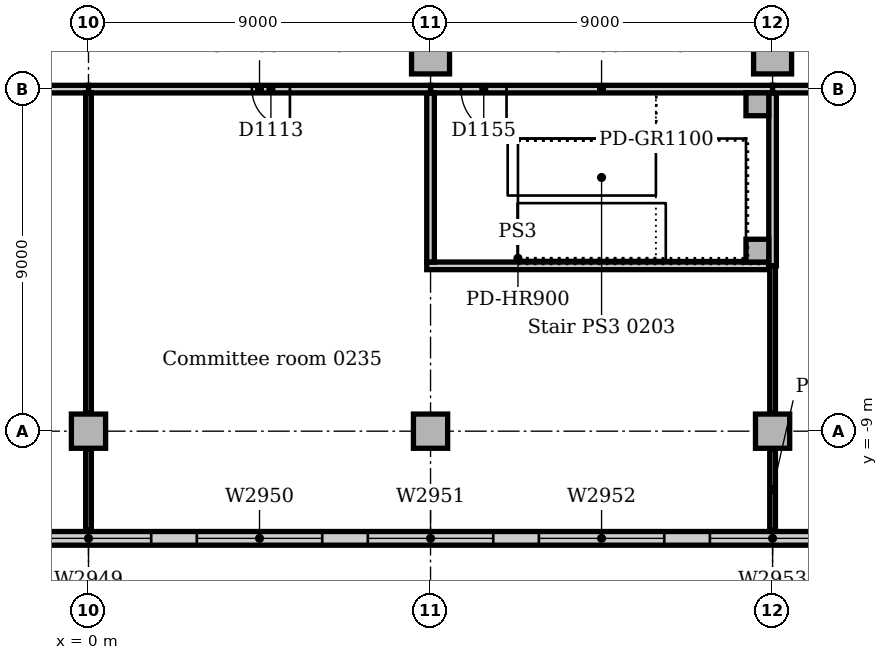
"""IFC4 building model, lengths in metres.
Left out: names, types, materials, properties, quantities, classifications, styles, units other than length and angle.
Written with IfcOpenShell. Run it as: python <this file> out.ifc"""

import sys

from ifc_helpers import new_model, si_unit, direction, frame, frame_2d, origin, origin_with_axes, origin_2d, place, context, subcontext, project, spatial, rectangle, extrude, element, fill, save


model = new_model("IFC4")
c1 = context("Model", 3, precision=1e-05, world=origin(), true_north=direction((0.0, 1.0)))
c2 = subcontext(c1, "Body", "Model", "MODEL_VIEW")
j1 = project(units=[si_unit("LENGTHUNIT", "METRE"), si_unit("PLANEANGLEUNIT", "RADIAN")], contexts=[c1])
p1 = place(None, origin())
s1 = spatial("IfcSite", under=j1, at=p1, CompositionType="ELEMENT")
p2 = place(p1, origin())
s2 = spatial("IfcBuilding", under=s1, at=p2, CompositionType="ELEMENT")
p3 = place(p2, frame((0.0, 0.0, 11.0)))
s3 = spatial("IfcBuildingStorey", under=s2, at=p3, CompositionType="ELEMENT", Elevation=11.0)
p4 = place(p3, frame((3.602, 1.453, 0.0), z_axis=(0.0, 0.0, 1.0), x_axis=(1.0, 0.0, 0.0)))
e1 = element("IfcColumn", 1, at=p4, inside=s3, PredefinedType="COLUMN", context=c2, shape_type="SweptSolid", body=[
    extrude(rectangle(XDim=1.2, YDim=1.2, at=origin_2d()), origin(), (0.0, 0.0, 1.0), 4.7),
])
for number, where, z_axis, x_axis in (
    (2, (9.0, 0.9, 0.0), (0.0, 0.0, 1.0), (1.0, 0.0, 0.0)),
    (3, (18.0, 0.9, 0.0), (0.0, 0.0, 1.0), (1.0, 0.0, 0.0)),
):
    element("IfcColumn", number, at=place(p3, frame(where, z_axis=z_axis, x_axis=x_axis)), inside=s3, PredefinedType="COLUMN", context=c2, shape_type="SweptSolid", body=[
        extrude(rectangle(XDim=1.0, YDim=1.0, at=origin_2d()), origin(), (0.0, 0.0, 1.0), 4.7),
    ])
for number, where, z_axis, x_axis in (
    (4, (0.0, -9.0, 0.0), (0.0, 0.0, 1.0), (1.0, 0.0, 0.0)),
    (5, (9.0, -9.0, 0.0), (0.0, 0.0, 1.0), (1.0, 0.0, 0.0)),
    (6, (18.0, -9.0, 0.0), (0.0, 0.0, 1.0), (1.0, 0.0, 0.0)),
):
    element("IfcColumn", number, at=place(p3, frame(where, z_axis=z_axis, x_axis=x_axis)), inside=s3, PredefinedType="COLUMN", context=c2, shape_type="SweptSolid", body=[
        extrude(rectangle(XDim=0.9, YDim=0.9, at=origin_2d()), origin(), (0.0, 0.0, 1.0), 4.7),
    ])
p5 = place(p3, frame((-81.0, -11.82, 0.0), z_axis=(0.0, 0.0, 1.0), x_axis=(1.0, 0.0, 0.0)))
e7 = element("IfcWall", 7, at=p5, inside=s3, PredefinedType="STANDARD", context=c2, shape_type="SweptSolid", body=[
    extrude(rectangle(XDim=144.0, YDim=0.36, at=frame_2d((72.0, 0.0))), origin(), (0.0, 0.0, 1.0), 4.7),
])
p6 = place(p5, frame((2.85, 0.0, 0.9)))
e8 = element("IfcOpeningElement", 8, at=p6, cuts=e7, PredefinedType="OPENING", context=c2, shape_type="SweptSolid", body=[
    extrude(rectangle(XDim=3.3, YDim=2.4, at=frame_2d((1.65, 1.2))), frame((0.0, 0.19, 0.0), z_axis=(0.0, -1.0, 0.0), x_axis=(1.0, 0.0, 0.0)), (0.0, 0.0, 1.0), 0.38),
])
p7 = place(p5, frame((7.35, 0.0, 0.9)))
e9 = element("IfcOpeningElement", 9, at=p7, cuts=e7, PredefinedType="OPENING", context=c2, shape_type="SweptSolid", body=[
    extrude(rectangle(XDim=3.3, YDim=2.4, at=frame_2d((1.65, 1.2))), frame((0.0, 0.19, 0.0), z_axis=(0.0, -1.0, 0.0), x_axis=(1.0, 0.0, 0.0)), (0.0, 0.0, 1.0), 0.38),
])
p8 = place(p5, frame((11.85, 0.0, 0.9)))
e10 = element("IfcOpeningElement", 10, at=p8, cuts=e7, PredefinedType="OPENING", context=c2, shape_type="SweptSolid", body=[
    extrude(rectangle(XDim=3.3, YDim=2.4, at=frame_2d((1.65, 1.2))), frame((0.0, 0.19, 0.0), z_axis=(0.0, -1.0, 0.0), x_axis=(1.0, 0.0, 0.0)), (0.0, 0.0, 1.0), 0.38),
])
p9 = place(p5, frame((16.35, 0.0, 0.9)))
e11 = element("IfcOpeningElement", 11, at=p9, cuts=e7, PredefinedType="OPENING", context=c2, shape_type="SweptSolid", body=[
    extrude(rectangle(XDim=3.3, YDim=2.4, at=frame_2d((1.65, 1.2))), frame((0.0, 0.19, 0.0), z_axis=(0.0, -1.0, 0.0), x_axis=(1.0, 0.0, 0.0)), (0.0, 0.0, 1.0), 0.38),
])
p10 = place(p5, frame((20.85, 0.0, 0.9)))
e12 = element("IfcOpeningElement", 12, at=p10, cuts=e7, PredefinedType="OPENING", context=c2, shape_type="SweptSolid", body=[
    extrude(rectangle(XDim=3.3, YDim=2.4, at=frame_2d((1.65, 1.2))), frame((0.0, 0.19, 0.0), z_axis=(0.0, -1.0, 0.0), x_axis=(1.0, 0.0, 0.0)), (0.0, 0.0, 1.0), 0.38),
])
p11 = place(p5, frame((25.35, 0.0, 0.9)))
e13 = element("IfcOpeningElement", 13, at=p11, cuts=e7, PredefinedType="OPENING", context=c2, shape_type="SweptSolid", body=[
    extrude(rectangle(XDim=3.3, YDim=2.4, at=frame_2d((1.65, 1.2))), frame((0.0, 0.19, 0.0), z_axis=(0.0, -1.0, 0.0), x_axis=(1.0, 0.0, 0.0)), (0.0, 0.0, 1.0), 0.38),
])
p12 = place(p5, frame((29.85, 0.0, 0.9)))
e14 = element("IfcOpeningElement", 14, at=p12, cuts=e7, PredefinedType="OPENING", context=c2, shape_type="SweptSolid", body=[
    extrude(rectangle(XDim=3.3, YDim=2.4, at=frame_2d((1.65, 1.2))), frame((0.0, 0.19, 0.0), z_axis=(0.0, -1.0, 0.0), x_axis=(1.0, 0.0, 0.0)), (0.0, 0.0, 1.0), 0.38),
])
p13 = place(p5, frame((34.35, 0.0, 0.9)))
e15 = element("IfcOpeningElement", 15, at=p13, cuts=e7, PredefinedType="OPENING", context=c2, shape_type="SweptSolid", body=[
    extrude(rectangle(XDim=3.3, YDim=2.4, at=frame_2d((1.65, 1.2))), frame((0.0, 0.19, 0.0), z_axis=(0.0, -1.0, 0.0), x_axis=(1.0, 0.0, 0.0)), (0.0, 0.0, 1.0), 0.38),
])
p14 = place(p5, frame((38.85, 0.0, 0.9)))
e16 = element("IfcOpeningElement", 16, at=p14, cuts=e7, PredefinedType="OPENING", context=c2, shape_type="SweptSolid", body=[
    extrude(rectangle(XDim=3.3, YDim=2.4, at=frame_2d((1.65, 1.2))), frame((0.0, 0.19, 0.0), z_axis=(0.0, -1.0, 0.0), x_axis=(1.0, 0.0, 0.0)), (0.0, 0.0, 1.0), 0.38),
])
p15 = place(p5, frame((43.35, 0.0, 0.9)))
e17 = element("IfcOpeningElement", 17, at=p15, cuts=e7, PredefinedType="OPENING", context=c2, shape_type="SweptSolid", body=[
    extrude(rectangle(XDim=3.3, YDim=2.4, at=frame_2d((1.65, 1.2))), frame((0.0, 0.19, 0.0), z_axis=(0.0, -1.0, 0.0), x_axis=(1.0, 0.0, 0.0)), (0.0, 0.0, 1.0), 0.38),
])
p16 = place(p5, frame((47.85, 0.0, 0.9)))
e18 = element("IfcOpeningElement", 18, at=p16, cuts=e7, PredefinedType="OPENING", context=c2, shape_type="SweptSolid", body=[
    extrude(rectangle(XDim=3.3, YDim=2.4, at=frame_2d((1.65, 1.2))), frame((0.0, 0.19, 0.0), z_axis=(0.0, -1.0, 0.0), x_axis=(1.0, 0.0, 0.0)), (0.0, 0.0, 1.0), 0.38),
])
p17 = place(p5, frame((52.35, 0.0, 0.9)))
e19 = element("IfcOpeningElement", 19, at=p17, cuts=e7, PredefinedType="OPENING", context=c2, shape_type="SweptSolid", body=[
    extrude(rectangle(XDim=3.3, YDim=2.4, at=frame_2d((1.65, 1.2))), frame((0.0, 0.19, 0.0), z_axis=(0.0, -1.0, 0.0), x_axis=(1.0, 0.0, 0.0)), (0.0, 0.0, 1.0), 0.38),
])
p18 = place(p5, frame((56.85, 0.0, 0.9)))
e20 = element("IfcOpeningElement", 20, at=p18, cuts=e7, PredefinedType="OPENING", context=c2, shape_type="SweptSolid", body=[
    extrude(rectangle(XDim=3.3, YDim=2.4, at=frame_2d((1.65, 1.2))), frame((0.0, 0.19, 0.0), z_axis=(0.0, -1.0, 0.0), x_axis=(1.0, 0.0, 0.0)), (0.0, 0.0, 1.0), 0.38),
])
p19 = place(p5, frame((61.35, 0.0, 0.9)))
e21 = element("IfcOpeningElement", 21, at=p19, cuts=e7, PredefinedType="OPENING", context=c2, shape_type="SweptSolid", body=[
    extrude(rectangle(XDim=3.3, YDim=2.4, at=frame_2d((1.65, 1.2))), frame((0.0, 0.19, 0.0), z_axis=(0.0, -1.0, 0.0), x_axis=(1.0, 0.0, 0.0)), (0.0, 0.0, 1.0), 0.38),
])
p20 = place(p5, frame((65.85, 0.0, 0.9)))
e22 = element("IfcOpeningElement", 22, at=p20, cuts=e7, PredefinedType="OPENING", context=c2, shape_type="SweptSolid", body=[
    extrude(rectangle(XDim=3.3, YDim=2.4, at=frame_2d((1.65, 1.2))), frame((0.0, 0.19, 0.0), z_axis=(0.0, -1.0, 0.0), x_axis=(1.0, 0.0, 0.0)), (0.0, 0.0, 1.0), 0.38),
])
p21 = place(p5, frame((70.35, 0.0, 0.9)))
e23 = element("IfcOpeningElement", 23, at=p21, cuts=e7, PredefinedType="OPENING", context=c2, shape_type="SweptSolid", body=[
    extrude(rectangle(XDim=3.3, YDim=2.4, at=frame_2d((1.65, 1.2))), frame((0.0, 0.19, 0.0), z_axis=(0.0, -1.0, 0.0), x_axis=(1.0, 0.0, 0.0)), (0.0, 0.0, 1.0), 0.38),
])
p22 = place(p5, frame((74.85, 0.0, 0.9)))
e24 = element("IfcOpeningElement", 24, at=p22, cuts=e7, PredefinedType="OPENING", context=c2, shape_type="SweptSolid", body=[
    extrude(rectangle(XDim=3.3, YDim=2.4, at=frame_2d((1.65, 1.2))), frame((0.0, 0.19, 0.0), z_axis=(0.0, -1.0, 0.0), x_axis=(1.0, 0.0, 0.0)), (0.0, 0.0, 1.0), 0.38),
])
p23 = place(p5, frame((79.35, 0.0, 0.9)))
e25 = element("IfcOpeningElement", 25, at=p23, cuts=e7, PredefinedType="OPENING", context=c2, shape_type="SweptSolid", body=[
    extrude(rectangle(XDim=3.3, YDim=2.4, at=frame_2d((1.65, 1.2))), frame((0.0, 0.19, 0.0), z_axis=(0.0, -1.0, 0.0), x_axis=(1.0, 0.0, 0.0)), (0.0, 0.0, 1.0), 0.38),
])
p24 = place(p5, frame((83.85, 0.0, 0.9)))
e26 = element("IfcOpeningElement", 26, at=p24, cuts=e7, PredefinedType="OPENING", context=c2, shape_type="SweptSolid", body=[
    extrude(rectangle(XDim=3.3, YDim=2.4, at=frame_2d((1.65, 1.2))), frame((0.0, 0.19, 0.0), z_axis=(0.0, -1.0, 0.0), x_axis=(1.0, 0.0, 0.0)), (0.0, 0.0, 1.0), 0.38),
])
p25 = place(p5, frame((88.35, 0.0, 0.9)))
e27 = element("IfcOpeningElement", 27, at=p25, cuts=e7, PredefinedType="OPENING", context=c2, shape_type="SweptSolid", body=[
    extrude(rectangle(XDim=3.3, YDim=2.4, at=frame_2d((1.65, 1.2))), frame((0.0, 0.19, 0.0), z_axis=(0.0, -1.0, 0.0), x_axis=(1.0, 0.0, 0.0)), (0.0, 0.0, 1.0), 0.38),
])
p26 = place(p5, frame((92.85, 0.0, 0.9)))
e28 = element("IfcOpeningElement", 28, at=p26, cuts=e7, PredefinedType="OPENING", context=c2, shape_type="SweptSolid", body=[
    extrude(rectangle(XDim=3.3, YDim=2.4, at=frame_2d((1.65, 1.2))), frame((0.0, 0.19, 0.0), z_axis=(0.0, -1.0, 0.0), x_axis=(1.0, 0.0, 0.0)), (0.0, 0.0, 1.0), 0.38),
])
p27 = place(p5, frame((97.35, 0.0, 0.9)))
e29 = element("IfcOpeningElement", 29, at=p27, cuts=e7, PredefinedType="OPENING", context=c2, shape_type="SweptSolid", body=[
    extrude(rectangle(XDim=3.3, YDim=2.4, at=frame_2d((1.65, 1.2))), frame((0.0, 0.19, 0.0), z_axis=(0.0, -1.0, 0.0), x_axis=(1.0, 0.0, 0.0)), (0.0, 0.0, 1.0), 0.38),
])
p28 = place(p5, frame((101.85, 0.0, 0.9)))
e30 = element("IfcOpeningElement", 30, at=p28, cuts=e7, PredefinedType="OPENING", context=c2, shape_type="SweptSolid", body=[
    extrude(rectangle(XDim=3.3, YDim=2.4, at=frame_2d((1.65, 1.2))), frame((0.0, 0.19, 0.0), z_axis=(0.0, -1.0, 0.0), x_axis=(1.0, 0.0, 0.0)), (0.0, 0.0, 1.0), 0.38),
])
p29 = place(p5, frame((106.35, 0.0, 0.9)))
e31 = element("IfcOpeningElement", 31, at=p29, cuts=e7, PredefinedType="OPENING", context=c2, shape_type="SweptSolid", body=[
    extrude(rectangle(XDim=3.3, YDim=2.4, at=frame_2d((1.65, 1.2))), frame((0.0, 0.19, 0.0), z_axis=(0.0, -1.0, 0.0), x_axis=(1.0, 0.0, 0.0)), (0.0, 0.0, 1.0), 0.38),
])
p30 = place(p5, frame((110.85, 0.0, 0.9)))
e32 = element("IfcOpeningElement", 32, at=p30, cuts=e7, PredefinedType="OPENING", context=c2, shape_type="SweptSolid", body=[
    extrude(rectangle(XDim=3.3, YDim=2.4, at=frame_2d((1.65, 1.2))), frame((0.0, 0.19, 0.0), z_axis=(0.0, -1.0, 0.0), x_axis=(1.0, 0.0, 0.0)), (0.0, 0.0, 1.0), 0.38),
])
p31 = place(p5, frame((115.35, 0.0, 0.9)))
e33 = element("IfcOpeningElement", 33, at=p31, cuts=e7, PredefinedType="OPENING", context=c2, shape_type="SweptSolid", body=[
    extrude(rectangle(XDim=3.3, YDim=2.4, at=frame_2d((1.65, 1.2))), frame((0.0, 0.19, 0.0), z_axis=(0.0, -1.0, 0.0), x_axis=(1.0, 0.0, 0.0)), (0.0, 0.0, 1.0), 0.38),
])
p32 = place(p5, frame((119.85, 0.0, 0.9)))
e34 = element("IfcOpeningElement", 34, at=p32, cuts=e7, PredefinedType="OPENING", context=c2, shape_type="SweptSolid", body=[
    extrude(rectangle(XDim=3.3, YDim=2.4, at=frame_2d((1.65, 1.2))), frame((0.0, 0.19, 0.0), z_axis=(0.0, -1.0, 0.0), x_axis=(1.0, 0.0, 0.0)), (0.0, 0.0, 1.0), 0.38),
])
p33 = place(p5, frame((124.35, 0.0, 0.9)))
e35 = element("IfcOpeningElement", 35, at=p33, cuts=e7, PredefinedType="OPENING", context=c2, shape_type="SweptSolid", body=[
    extrude(rectangle(XDim=3.3, YDim=2.4, at=frame_2d((1.65, 1.2))), frame((0.0, 0.19, 0.0), z_axis=(0.0, -1.0, 0.0), x_axis=(1.0, 0.0, 0.0)), (0.0, 0.0, 1.0), 0.38),
])
p34 = place(p5, frame((128.85, 0.0, 0.9)))
e36 = element("IfcOpeningElement", 36, at=p34, cuts=e7, PredefinedType="OPENING", context=c2, shape_type="SweptSolid", body=[
    extrude(rectangle(XDim=3.3, YDim=2.4, at=frame_2d((1.65, 1.2))), frame((0.0, 0.19, 0.0), z_axis=(0.0, -1.0, 0.0), x_axis=(1.0, 0.0, 0.0)), (0.0, 0.0, 1.0), 0.38),
])
p35 = place(p5, frame((133.35, 0.0, 0.9)))
e37 = element("IfcOpeningElement", 37, at=p35, cuts=e7, PredefinedType="OPENING", context=c2, shape_type="SweptSolid", body=[
    extrude(rectangle(XDim=3.3, YDim=2.4, at=frame_2d((1.65, 1.2))), frame((0.0, 0.19, 0.0), z_axis=(0.0, -1.0, 0.0), x_axis=(1.0, 0.0, 0.0)), (0.0, 0.0, 1.0), 0.38),
])
p36 = place(p5, frame((137.85, 0.0, 0.9)))
e38 = element("IfcOpeningElement", 38, at=p36, cuts=e7, PredefinedType="OPENING", context=c2, shape_type="SweptSolid", body=[
    extrude(rectangle(XDim=3.3, YDim=2.4, at=frame_2d((1.65, 1.2))), frame((0.0, 0.19, 0.0), z_axis=(0.0, -1.0, 0.0), x_axis=(1.0, 0.0, 0.0)), (0.0, 0.0, 1.0), 0.38),
])
for number, where, z_axis, x_axis in (
    (39, (17.6, -4.25, 0.0), (0.0, 0.0, 1.0), (1.0, 0.0, 0.0)),
    (40, (17.6, -0.4, 0.0), (0.0, 0.0, 1.0), (1.0, 0.0, 0.0)),
):
    element("IfcColumn", number, at=place(p3, frame(where, z_axis=z_axis, x_axis=x_axis)), inside=s3, PredefinedType="COLUMN", context=c2, shape_type="SweptSolid", body=[
        extrude(rectangle(XDim=0.6, YDim=0.6, at=origin_2d()), origin(), (0.0, 0.0, 1.0), 5.0),
    ])
p37 = place(p3, frame((9.0, 0.0, 0.0), z_axis=(0.0, 0.0, 1.0), x_axis=(1.0, 0.0, 0.0)))
e41 = element("IfcWall", 41, at=p37, inside=s3, PredefinedType="SOLIDWALL", context=c2, shape_type="SweptSolid", body=[
    extrude(rectangle(XDim=9.0, YDim=0.2, at=frame_2d((4.5, 0.0))), origin(), (0.0, 0.0, 1.0), 4.7),
])
p38 = place(p37, frame((0.8, 0.0, 0.0)))
e42 = element("IfcOpeningElement", 42, at=p38, cuts=e41, PredefinedType="OPENING", context=c2, shape_type="SweptSolid", body=[
    extrude(rectangle(XDim=1.2, YDim=2.1, at=frame_2d((0.6, 1.05))), frame((0.0, 0.11, 0.0), z_axis=(0.0, -1.0, 0.0), x_axis=(1.0, 0.0, 0.0)), (0.0, 0.0, 1.0), 0.22),
])
p39 = place(p3, frame((8.9, -4.65, 0.0), z_axis=(0.0, 0.0, 1.0), x_axis=(1.0, 0.0, 0.0)))
e43 = element("IfcWall", 43, at=p39, inside=s3, PredefinedType="SOLIDWALL", context=c2, shape_type="SweptSolid", body=[
    extrude(rectangle(XDim=9.0, YDim=0.2, at=frame_2d((4.5, 0.0))), origin(), (0.0, 0.0, 1.0), 4.7),
])
p40 = place(p3, frame((9.0, -4.55, 0.0), z_axis=(0.0, 0.0, 1.0), x_axis=(0.0, 1.0, 0.0)))
e44 = element("IfcWall", 44, at=p40, inside=s3, PredefinedType="SOLIDWALL", context=c2, shape_type="SweptSolid", body=[
    extrude(rectangle(XDim=4.45, YDim=0.2, at=frame_2d((2.225, 0.0))), origin(), (0.0, 0.0, 1.0), 4.7),
])
p41 = place(p3, frame((18.0, -4.65, 0.0), z_axis=(0.0, 0.0, 1.0), x_axis=(0.0, 1.0, 0.0)))
e45 = element("IfcWall", 45, at=p41, inside=s3, PredefinedType="SOLIDWALL", context=c2, shape_type="SweptSolid", body=[
    extrude(rectangle(XDim=4.55, YDim=0.2, at=frame_2d((2.275, 0.0))), origin(), (0.0, 0.0, 1.0), 4.7),
])
p42 = place(p3, origin_with_axes())
e46 = element("IfcWall", 46, at=p42, inside=s3, PredefinedType="PARTITIONING", context=c2, shape_type="SweptSolid", body=[
    extrude(rectangle(XDim=9.0, YDim=0.2, at=frame_2d((4.5, 0.0))), origin(), (0.0, 0.0, 1.0), 4.7),
])
p43 = place(p42, frame((4.3, 0.0, 0.0)))
e47 = element("IfcOpeningElement", 47, at=p43, cuts=e46, PredefinedType="OPENING", context=c2, shape_type="SweptSolid", body=[
    extrude(rectangle(XDim=1.0, YDim=2.1, at=frame_2d((0.5, 1.05))), frame((0.0, 0.11, 0.0), z_axis=(0.0, -1.0, 0.0), x_axis=(1.0, 0.0, 0.0)), (0.0, 0.0, 1.0), 0.22),
])
p44 = place(p3, frame((18.0, 0.0, 0.0), z_axis=(0.0, 0.0, 1.0), x_axis=(1.0, 0.0, 0.0)))
e48 = element("IfcWall", 48, at=p44, inside=s3, PredefinedType="PARTITIONING", context=c2, shape_type="SweptSolid", body=[
    extrude(rectangle(XDim=9.0, YDim=0.2, at=frame_2d((4.5, 0.0))), origin(), (0.0, 0.0, 1.0), 4.7),
])
p45 = place(p44, frame((4.0, 0.0, 0.0)))
e49 = element("IfcOpeningElement", 49, at=p45, cuts=e48, PredefinedType="OPENING", context=c2, shape_type="SweptSolid", body=[
    extrude(rectangle(XDim=1.0, YDim=2.1, at=frame_2d((0.5, 1.05))), frame((0.0, 0.11, 0.0), z_axis=(0.0, -1.0, 0.0), x_axis=(1.0, 0.0, 0.0)), (0.0, 0.0, 1.0), 0.22),
])
p46 = place(p3, frame((-8.53, 0.0, 0.0), z_axis=(0.0, 0.0, 1.0), x_axis=(1.0, 0.0, 0.0)))
e50 = element("IfcWall", 50, at=p46, inside=s3, PredefinedType="PARTITIONING", context=c2, shape_type="SweptSolid", body=[
    extrude(rectangle(XDim=8.53, YDim=0.2, at=frame_2d((4.265, 0.0))), origin(), (0.0, 0.0, 1.0), 4.7),
])
p47 = place(p46, frame((3.53, 0.0, 0.0)))
e51 = element("IfcOpeningElement", 51, at=p47, cuts=e50, PredefinedType="OPENING", context=c2, shape_type="SweptSolid", body=[
    extrude(rectangle(XDim=1.0, YDim=2.1, at=frame_2d((0.5, 1.05))), frame((0.0, 0.11, 0.0), z_axis=(0.0, -1.0, 0.0), x_axis=(1.0, 0.0, 0.0)), (0.0, 0.0, 1.0), 0.22),
])
p48 = place(p3, frame((0.0, -11.6, 0.0), z_axis=(0.0, 0.0, 1.0), x_axis=(0.0, 1.0, 0.0)))
e52 = element("IfcWall", 52, at=p48, inside=s3, PredefinedType="PARTITIONING", context=c2, shape_type="SweptSolid", body=[
    extrude(rectangle(XDim=2.13, YDim=0.15, at=frame_2d((1.065, 0.0))), origin(), (0.0, 0.0, 1.0), 4.7),
])
p49 = place(p3, frame((0.0, -8.53, 0.0), z_axis=(0.0, 0.0, 1.0), x_axis=(0.0, 1.0, 0.0)))
e53 = element("IfcWall", 53, at=p49, inside=s3, PredefinedType="PARTITIONING", context=c2, shape_type="SweptSolid", body=[
    extrude(rectangle(XDim=8.43, YDim=0.15, at=frame_2d((4.215, 0.0))), origin(), (0.0, 0.0, 1.0), 4.7),
])
p50 = place(p3, frame((18.0, -11.6, 0.0), z_axis=(0.0, 0.0, 1.0), x_axis=(0.0, 1.0, 0.0)))
e54 = element("IfcWall", 54, at=p50, inside=s3, PredefinedType="PARTITIONING", context=c2, shape_type="SweptSolid", body=[
    extrude(rectangle(XDim=2.13, YDim=0.15, at=frame_2d((1.065, 0.0))), origin(), (0.0, 0.0, 1.0), 4.7),
])
p51 = place(p3, frame((18.0, -8.53, 0.0), z_axis=(0.0, 0.0, 1.0), x_axis=(0.0, 1.0, 0.0)))
e55 = element("IfcWall", 55, at=p51, inside=s3, PredefinedType="PARTITIONING", context=c2, shape_type="SweptSolid", body=[
    extrude(rectangle(XDim=3.88, YDim=0.15, at=frame_2d((1.94, 0.0))), origin(), (0.0, 0.0, 1.0), 4.7),
])
p52 = place(p23, origin())
e56 = element("IfcWindow", 56, at=p52, inside=s3, PartitioningType="SINGLE_PANEL", PredefinedType="WINDOW", context=c2, shape_type="SweptSolid", body=[
    extrude(rectangle(XDim=3.3, YDim=2.4, at=frame_2d((1.65, 1.2))), frame((0.0, 0.13, 0.0), z_axis=(0.0, -1.0, 0.0), x_axis=(1.0, 0.0, 0.0)), (0.0, 0.0, 1.0), 0.06),
])
fill(e25, e56)
p53 = place(p24, origin())
e57 = element("IfcWindow", 57, at=p53, inside=s3, PartitioningType="SINGLE_PANEL", PredefinedType="WINDOW", context=c2, shape_type="SweptSolid", body=[
    extrude(rectangle(XDim=3.3, YDim=2.4, at=frame_2d((1.65, 1.2))), frame((0.0, 0.13, 0.0), z_axis=(0.0, -1.0, 0.0), x_axis=(1.0, 0.0, 0.0)), (0.0, 0.0, 1.0), 0.06),
])
fill(e26, e57)
p54 = place(p25, origin())
e58 = element("IfcWindow", 58, at=p54, inside=s3, PartitioningType="SINGLE_PANEL", PredefinedType="WINDOW", context=c2, shape_type="SweptSolid", body=[
    extrude(rectangle(XDim=3.3, YDim=2.4, at=frame_2d((1.65, 1.2))), frame((0.0, 0.13, 0.0), z_axis=(0.0, -1.0, 0.0), x_axis=(1.0, 0.0, 0.0)), (0.0, 0.0, 1.0), 0.06),
])
fill(e27, e58)
p55 = place(p26, origin())
e59 = element("IfcWindow", 59, at=p55, inside=s3, PartitioningType="SINGLE_PANEL", PredefinedType="WINDOW", context=c2, shape_type="SweptSolid", body=[
    extrude(rectangle(XDim=3.3, YDim=2.4, at=frame_2d((1.65, 1.2))), frame((0.0, 0.13, 0.0), z_axis=(0.0, -1.0, 0.0), x_axis=(1.0, 0.0, 0.0)), (0.0, 0.0, 1.0), 0.06),
])
fill(e28, e59)
p56 = place(p27, origin())
e60 = element("IfcWindow", 60, at=p56, inside=s3, PartitioningType="SINGLE_PANEL", PredefinedType="WINDOW", context=c2, shape_type="SweptSolid", body=[
    extrude(rectangle(XDim=3.3, YDim=2.4, at=frame_2d((1.65, 1.2))), frame((0.0, 0.13, 0.0), z_axis=(0.0, -1.0, 0.0), x_axis=(1.0, 0.0, 0.0)), (0.0, 0.0, 1.0), 0.06),
])
fill(e29, e60)
p57 = place(p43, frame((1.0, 0.0, 0.0), z_axis=(0.0, 0.0, 1.0), x_axis=(-1.0, 0.0, 0.0)))
e61 = element("IfcDoor", 61, at=p57, inside=s3, OperationType="SINGLE_SWING_LEFT", PredefinedType="DOOR", context=c2, shape_type="SweptSolid", body=[
    extrude(rectangle(XDim=1.0, YDim=2.1, at=frame_2d((0.5, 1.05))), frame((0.0, 0.025, 0.0), z_axis=(0.0, -1.0, 0.0), x_axis=(1.0, 0.0, 0.0)), (0.0, 0.0, 1.0), 0.05),
])
fill(e47, e61)
p58 = place(p38, frame((1.2, 0.0, 0.0), z_axis=(0.0, 0.0, 1.0), x_axis=(-1.0, 0.0, 0.0)))
e62 = element("IfcDoor", 62, at=p58, inside=s3, OperationType="SINGLE_SWING_LEFT", PredefinedType="DOOR", context=c2, shape_type="SweptSolid", body=[
    extrude(rectangle(XDim=1.2, YDim=2.1, at=frame_2d((0.6, 1.05))), frame((0.0, 0.025, 0.0), z_axis=(0.0, -1.0, 0.0), x_axis=(1.0, 0.0, 0.0)), (0.0, 0.0, 1.0), 0.05),
])
fill(e42, e62)
save(model, sys.argv[1])
